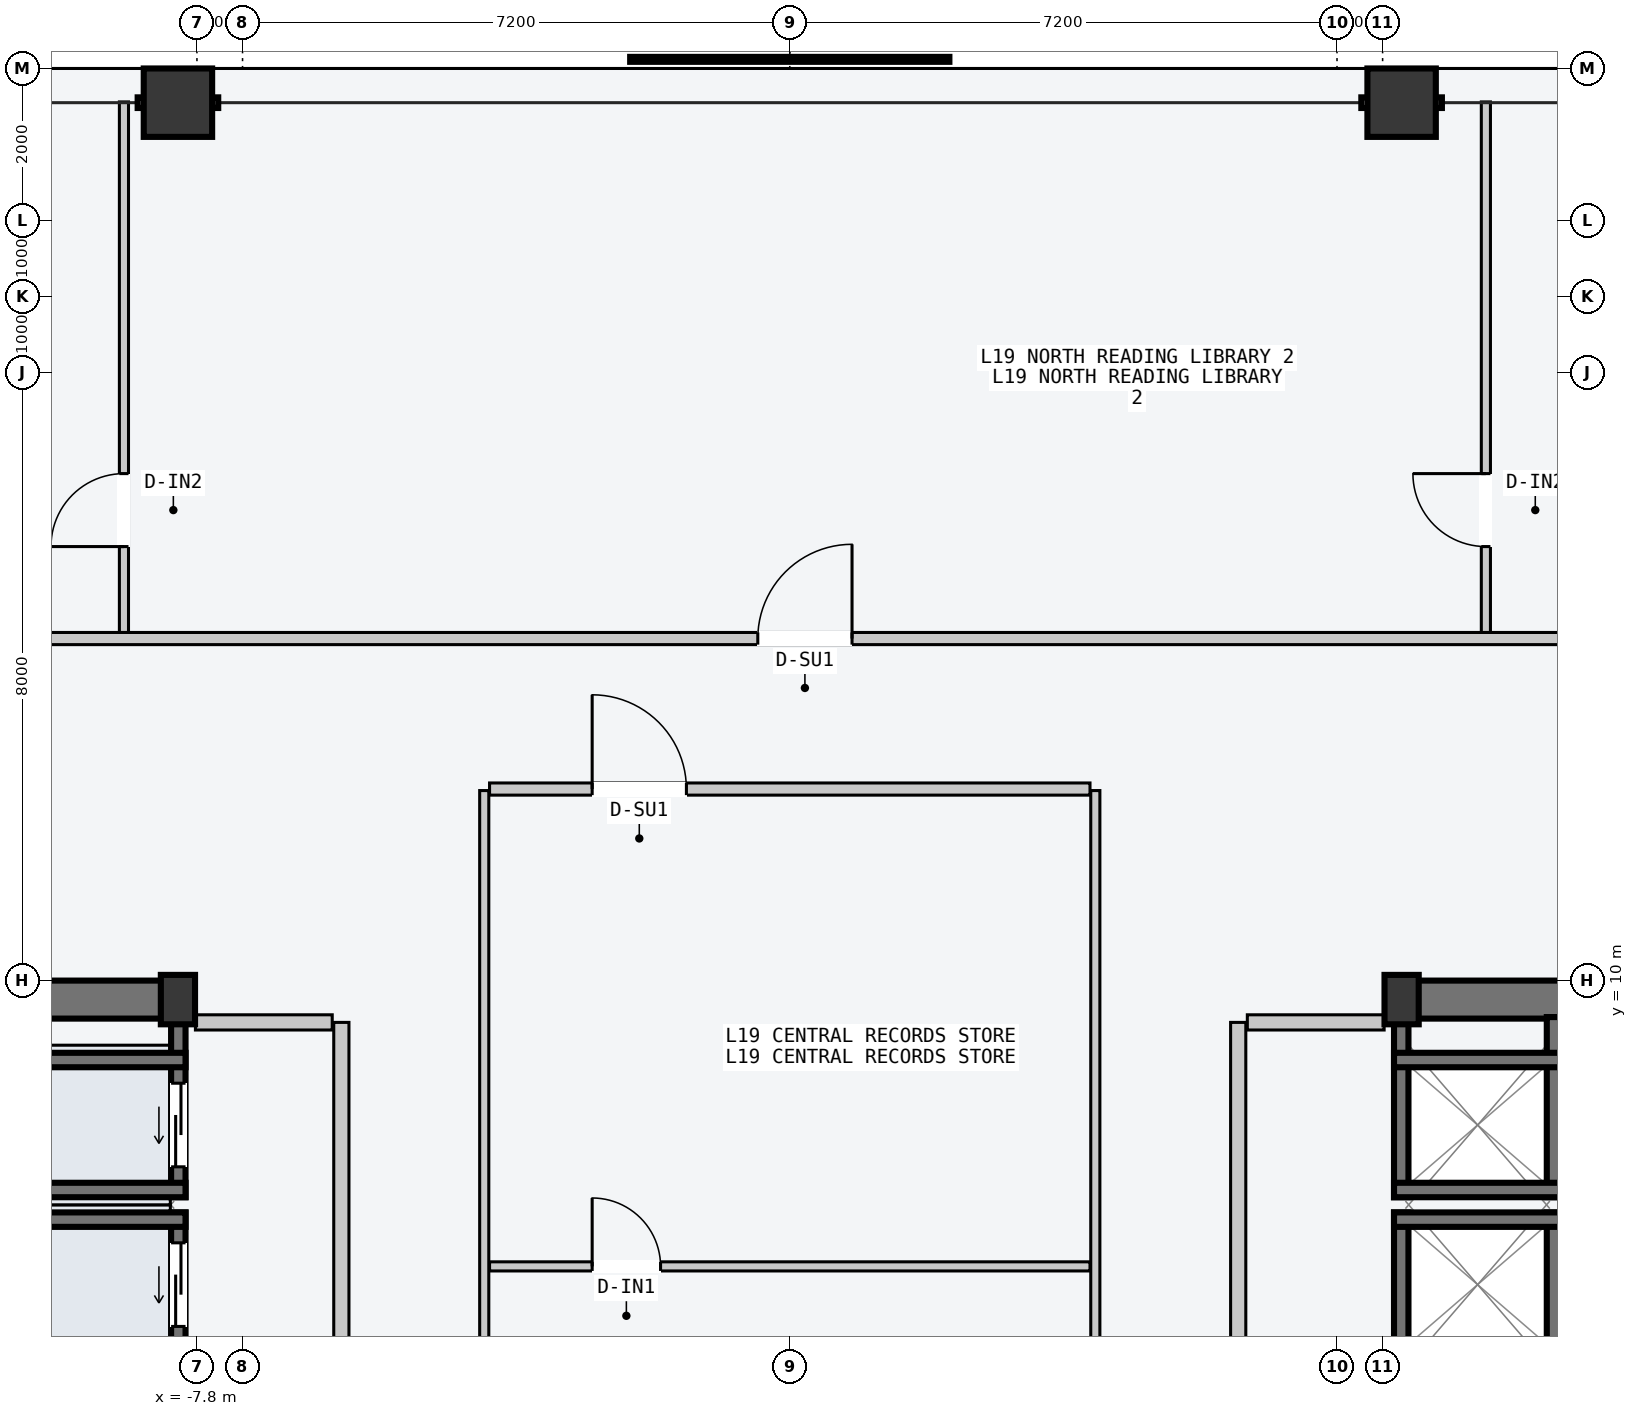
"""IFC4 building model, lengths in metres.
Left out: names, types, materials, properties, quantities, classifications, styles, units other than length and angle.
Written with IfcOpenShell. Run it as: python <this file> out.ifc"""

import sys

from ifc_helpers import new_model, si_unit, direction, frame, frame_2d, origin, origin_2d, place, context, subcontext, project, spatial, rectangle, hollow_rectangle, i_section, extrude, element, fill, save


model = new_model("IFC4")
c1 = context("Model", 3, precision=1e-05, world=origin(), true_north=direction((0.0, 1.0)))
c2 = subcontext(c1, "Body", "Model", "MODEL_VIEW")
j1 = project(units=[si_unit("LENGTHUNIT", "METRE"), si_unit("PLANEANGLEUNIT", "RADIAN")], contexts=[c1])
p1 = place(None, origin())
s1 = spatial("IfcSite", under=j1, at=p1, CompositionType="ELEMENT")
p2 = place(p1, origin())
s2 = spatial("IfcBuilding", under=s1, at=p2, CompositionType="ELEMENT")
p3 = place(p2, frame((0.0, 0.0, 74.4)))
s3 = spatial("IfcBuildingStorey", under=s2, at=p3, CompositionType="ELEMENT", Elevation=74.4)
for number, where, z_axis, x_axis in (
    (1, (-14.53, 9.75, -0.2), (0.0, 0.0, 1.0), (1.0, 0.0, 0.0)),
    (2, (8.07, 9.75, -0.2), (0.0, 0.0, 1.0), (1.0, 0.0, 0.0)),
):
    element("IfcWall", number, at=place(p3, frame(where, z_axis=z_axis, x_axis=x_axis)), inside=s3, PredefinedType="SHEAR", context=c2, shape_type="SweptSolid", body=[
        extrude(rectangle(XDim=6.46, YDim=0.5, at=frame_2d((3.23, 0.0))), origin(), (0.0, 0.0, 1.0), 3.6),
    ])
for number, where, z_axis, x_axis in (
    (3, (-8.05, 9.75, 0.0), (0.0, 0.0, 1.0), (1.0, 0.0, 0.0)),
    (4, (8.05, 9.75, 0.0), (0.0, 0.0, 1.0), (1.0, 0.0, 0.0)),
):
    element("IfcColumn", number, at=place(p3, frame(where, z_axis=z_axis, x_axis=x_axis)), inside=s3, PredefinedType="COLUMN", context=c2, shape_type="SweptSolid", body=[
        extrude(i_section(OverallWidth=0.45, OverallDepth=0.65, WebThickness=0.025, FlangeThickness=0.04, at=origin_2d()), origin(), (0.0, 0.0, 1.0), 3.6),
    ])
for number, where, z_axis, x_axis in (
    (5, (-8.05, 21.55, 0.0), (0.0, 0.0, 1.0), (1.0, 0.0, 0.0)),
    (6, (8.05, 21.55, 0.0), (0.0, 0.0, 1.0), (1.0, 0.0, 0.0)),
):
    element("IfcColumn", number, at=place(p3, frame(where, z_axis=z_axis, x_axis=x_axis)), inside=s3, PredefinedType="COLUMN", context=c2, shape_type="SweptSolid", body=[
        extrude(hollow_rectangle(XDim=0.9, YDim=0.9, WallThickness=0.045, at=origin_2d()), origin(), (0.0, 0.0, 1.0), 3.6),
    ])
p4 = place(p3, frame((-8.045, 5.05, -0.2), z_axis=(0.0, 0.0, 1.0), x_axis=(0.0, 1.0, 0.0)))
e7 = element("IfcWall", 7, at=p4, inside=s3, PredefinedType="SOLIDWALL", context=c2, shape_type="SweptSolid", body=[
    extrude(rectangle(XDim=1.9, YDim=0.19, at=frame_2d((0.95, 0.0))), origin(), (0.0, 0.0, 1.0), 3.6),
])
p5 = place(p4, frame((0.4, 0.0, 0.2)))
e8 = element("IfcOpeningElement", 8, at=p5, cuts=e7, PredefinedType="OPENING", context=c2, shape_type="SweptSolid", body=[
    extrude(rectangle(XDim=1.1, YDim=2.2, at=frame_2d((0.55, 1.1))), frame((0.0, 0.105, 0.0), z_axis=(0.0, -1.0, 0.0), x_axis=(1.0, 0.0, 0.0)), (0.0, 0.0, 1.0), 0.21),
])
p6 = place(p3, frame((-10.15, 6.855, -0.2), z_axis=(0.0, 0.0, 1.0), x_axis=(1.0, 0.0, 0.0)))
e9 = element("IfcWall", 9, at=p6, inside=s3, PredefinedType="SOLIDWALL", context=c2, shape_type="SweptSolid", body=[
    extrude(rectangle(XDim=2.2, YDim=0.19, at=frame_2d((1.1, 0.0))), origin(), (0.0, 0.0, 1.0), 3.6),
])
p7 = place(p3, frame((-8.045, 7.15, -0.2), z_axis=(0.0, 0.0, 1.0), x_axis=(0.0, 1.0, 0.0)))
e10 = element("IfcWall", 10, at=p7, inside=s3, PredefinedType="SOLIDWALL", context=c2, shape_type="SweptSolid", body=[
    extrude(rectangle(XDim=2.37, YDim=0.19, at=frame_2d((1.185, 0.0))), origin(), (0.0, 0.0, 1.0), 3.6),
])
p8 = place(p7, frame((0.4, 0.0, 0.2)))
e11 = element("IfcOpeningElement", 11, at=p8, cuts=e10, PredefinedType="OPENING", context=c2, shape_type="SweptSolid", body=[
    extrude(rectangle(XDim=1.1, YDim=2.2, at=frame_2d((0.55, 1.1))), frame((0.0, 0.105, 0.0), z_axis=(0.0, -1.0, 0.0), x_axis=(1.0, 0.0, 0.0)), (0.0, 0.0, 1.0), 0.21),
])
for number, where, z_axis, x_axis in (
    (12, (-10.15, 8.955, -0.2), (0.0, 0.0, 1.0), (1.0, 0.0, 0.0)),
    (13, (-10.15, 7.245, -0.2), (0.0, 0.0, 1.0), (1.0, 0.0, 0.0)),
):
    element("IfcWall", number, at=place(p3, frame(where, z_axis=z_axis, x_axis=x_axis)), inside=s3, PredefinedType="SOLIDWALL", context=c2, shape_type="SweptSolid", body=[
        extrude(rectangle(XDim=2.2, YDim=0.19, at=frame_2d((1.1, 0.0))), origin(), (0.0, 0.0, 1.0), 3.6),
    ])
for number, where, z_axis, x_axis in (
    (14, (8.045, 5.05, -0.2), (0.0, 0.0, 1.0), (0.0, 1.0, 0.0)),
    (15, (10.055, 5.05, -0.2), (0.0, 0.0, 1.0), (0.0, 1.0, 0.0)),
):
    element("IfcWall", number, at=place(p3, frame(where, z_axis=z_axis, x_axis=x_axis)), inside=s3, PredefinedType="SOLIDWALL", context=c2, shape_type="SweptSolid", body=[
        extrude(rectangle(XDim=1.9, YDim=0.19, at=frame_2d((0.95, 0.0))), origin(), (0.0, 0.0, 1.0), 3.6),
    ])
p9 = place(p3, frame((7.95, 6.855, -0.2), z_axis=(0.0, 0.0, 1.0), x_axis=(1.0, 0.0, 0.0)))
e16 = element("IfcWall", 16, at=p9, inside=s3, PredefinedType="SOLIDWALL", context=c2, shape_type="SweptSolid", body=[
    extrude(rectangle(XDim=2.2, YDim=0.19, at=frame_2d((1.1, 0.0))), origin(), (0.0, 0.0, 1.0), 3.6),
])
for number, where, z_axis, x_axis in (
    (17, (8.045, 7.15, -0.2), (0.0, 0.0, 1.0), (0.0, 1.0, 0.0)),
    (18, (10.055, 7.15, -0.2), (0.0, 0.0, 1.0), (0.0, 1.0, 0.0)),
):
    element("IfcWall", number, at=place(p3, frame(where, z_axis=z_axis, x_axis=x_axis)), inside=s3, PredefinedType="SOLIDWALL", context=c2, shape_type="SweptSolid", body=[
        extrude(rectangle(XDim=2.37, YDim=0.19, at=frame_2d((1.185, 0.0))), origin(), (0.0, 0.0, 1.0), 3.6),
    ])
for number, where, z_axis, x_axis in (
    (19, (7.95, 8.955, -0.2), (0.0, 0.0, 1.0), (1.0, 0.0, 0.0)),
    (20, (7.95, 7.245, -0.2), (0.0, 0.0, 1.0), (1.0, 0.0, 0.0)),
):
    element("IfcWall", number, at=place(p3, frame(where, z_axis=z_axis, x_axis=x_axis)), inside=s3, PredefinedType="SOLIDWALL", context=c2, shape_type="SweptSolid", body=[
        extrude(rectangle(XDim=2.2, YDim=0.19, at=frame_2d((1.1, 0.0))), origin(), (0.0, 0.0, 1.0), 3.6),
    ])
p10 = place(p3, frame((-5.9, -9.45, 0.0), z_axis=(0.0, 0.0, 1.0), x_axis=(0.0, 1.0, 0.0)))
e21 = element("IfcWall", 21, at=p10, inside=s3, PredefinedType="PARTITIONING", context=c2, shape_type="SweptSolid", body=[
    extrude(rectangle(XDim=18.9, YDim=0.2, at=frame_2d((9.45, 0.0))), origin(), (0.0, 0.0, 1.0), 3.4),
])
p11 = place(p10, frame((3.9, 0.0, 0.0)))
e22 = element("IfcOpeningElement", 22, at=p11, cuts=e21, PredefinedType="OPENING", context=c2, shape_type="SweptSolid", body=[
    extrude(rectangle(XDim=1.5, YDim=2.2, at=frame_2d((0.75, 1.1))), frame((0.0, 0.11, 0.0), z_axis=(0.0, -1.0, 0.0), x_axis=(1.0, 0.0, 0.0)), (0.0, 0.0, 1.0), 0.22),
])
p12 = place(p3, frame((-6.02, 9.45, 0.0), z_axis=(0.0, 0.0, 1.0), x_axis=(-1.0, 0.0, 0.0)))
e23 = element("IfcWall", 23, at=p12, inside=s3, PredefinedType="PARTITIONING", context=c2, shape_type="SweptSolid", body=[
    extrude(rectangle(XDim=1.8, YDim=0.2, at=frame_2d((0.9, 0.0))), origin(), (0.0, 0.0, 1.0), 3.4),
])
p13 = place(p3, frame((5.9, -9.45, 0.0), z_axis=(0.0, 0.0, 1.0), x_axis=(0.0, 1.0, 0.0)))
e24 = element("IfcWall", 24, at=p13, inside=s3, PredefinedType="PARTITIONING", context=c2, shape_type="SweptSolid", body=[
    extrude(rectangle(XDim=18.9, YDim=0.2, at=frame_2d((9.45, 0.0))), origin(), (0.0, 0.0, 1.0), 3.4),
])
p14 = place(p13, frame((3.9, 0.0, 0.0)))
e25 = element("IfcOpeningElement", 25, at=p14, cuts=e24, PredefinedType="OPENING", context=c2, shape_type="SweptSolid", body=[
    extrude(rectangle(XDim=1.5, YDim=2.2, at=frame_2d((0.75, 1.1))), frame((0.0, 0.11, 0.0), z_axis=(0.0, -1.0, 0.0), x_axis=(1.0, 0.0, 0.0)), (0.0, 0.0, 1.0), 0.22),
])
p15 = place(p3, frame((6.02, 9.45, 0.0), z_axis=(0.0, 0.0, 1.0), x_axis=(1.0, 0.0, 0.0)))
e26 = element("IfcWall", 26, at=p15, inside=s3, PredefinedType="PARTITIONING", context=c2, shape_type="SweptSolid", body=[
    extrude(rectangle(XDim=1.8, YDim=0.2, at=frame_2d((0.9, 0.0))), origin(), (0.0, 0.0, 1.0), 3.4),
])
for number, where, z_axis, x_axis in (
    (27, (-4.02, -12.5, 0.0), (0.0, 0.0, 1.0), (0.0, 1.0, 0.0)),
    (28, (4.02, -12.5, 0.0), (0.0, 0.0, 1.0), (0.0, 1.0, 0.0)),
):
    element("IfcWall", number, at=place(p3, frame(where, z_axis=z_axis, x_axis=x_axis)), inside=s3, PredefinedType="PARTITIONING", context=c2, shape_type="SweptSolid", body=[
        extrude(rectangle(XDim=25.0, YDim=0.12, at=frame_2d((12.5, 0.0))), origin(), (0.0, 0.0, 1.0), 3.4),
    ])
p16 = place(p3, frame((-3.95, 12.52, 0.0), z_axis=(0.0, 0.0, 1.0), x_axis=(1.0, 0.0, 0.0)))
e29 = element("IfcWall", 29, at=p16, inside=s3, PredefinedType="PARTITIONING", context=c2, shape_type="SweptSolid", body=[
    extrude(rectangle(XDim=7.9, YDim=0.16, at=frame_2d((3.95, 0.0))), origin(), (0.0, 0.0, 1.0), 3.4),
])
p17 = place(p16, frame((1.35, 0.0, 0.0)))
e30 = element("IfcOpeningElement", 30, at=p17, cuts=e29, PredefinedType="OPENING", context=c2, shape_type="SweptSolid", body=[
    extrude(rectangle(XDim=1.24, YDim=2.24, at=frame_2d((0.62, 1.12))), frame((0.0, 0.09, 0.0), z_axis=(0.0, -1.0, 0.0), x_axis=(1.0, 0.0, 0.0)), (0.0, 0.0, 1.0), 0.18),
])
p18 = place(p3, frame((-3.95, 6.24, 0.0), z_axis=(0.0, 0.0, 1.0), x_axis=(1.0, 0.0, 0.0)))
e31 = element("IfcWall", 31, at=p18, inside=s3, PredefinedType="PARTITIONING", context=c2, shape_type="SweptSolid", body=[
    extrude(rectangle(XDim=7.9, YDim=0.12, at=frame_2d((3.95, 0.0))), origin(), (0.0, 0.0, 1.0), 3.4),
])
p19 = place(p18, frame((1.35, 0.0, 0.0)))
e32 = element("IfcOpeningElement", 32, at=p19, cuts=e31, PredefinedType="OPENING", context=c2, shape_type="SweptSolid", body=[
    extrude(rectangle(XDim=0.9, YDim=2.15, at=frame_2d((0.45, 1.075))), frame((0.0, 0.07, 0.0), z_axis=(0.0, -1.0, 0.0), x_axis=(1.0, 0.0, 0.0)), (0.0, 0.0, 1.0), 0.14),
])
p20 = place(p3, frame((-8.76, 14.56, 0.0), z_axis=(0.0, 0.0, 1.0), x_axis=(0.0, 1.0, 0.0)))
e33 = element("IfcWall", 33, at=p20, inside=s3, PredefinedType="PARTITIONING", context=c2, shape_type="SweptSolid", body=[
    extrude(rectangle(XDim=7.0, YDim=0.12, at=frame_2d((3.5, 0.0))), origin(), (0.0, 0.0, 1.0), 3.4),
])
p21 = place(p20, frame((1.15, 0.0, 0.0)))
e34 = element("IfcOpeningElement", 34, at=p21, cuts=e33, PredefinedType="OPENING", context=c2, shape_type="SweptSolid", body=[
    extrude(rectangle(XDim=0.96, YDim=2.18, at=frame_2d((0.48, 1.09))), frame((0.0, 0.07, 0.0), z_axis=(0.0, -1.0, 0.0), x_axis=(1.0, 0.0, 0.0)), (0.0, 0.0, 1.0), 0.14),
])
p22 = place(p3, frame((9.159, 14.56, 0.0), z_axis=(0.0, 0.0, 1.0), x_axis=(0.0, 1.0, 0.0)))
e35 = element("IfcWall", 35, at=p22, inside=s3, PredefinedType="PARTITIONING", context=c2, shape_type="SweptSolid", body=[
    extrude(rectangle(XDim=7.0, YDim=0.12, at=frame_2d((3.5, 0.0))), origin(), (0.0, 0.0, 1.0), 3.4),
])
p23 = place(p22, frame((1.15, 0.0, 0.0)))
e36 = element("IfcOpeningElement", 36, at=p23, cuts=e35, PredefinedType="OPENING", context=c2, shape_type="SweptSolid", body=[
    extrude(rectangle(XDim=0.96, YDim=2.18, at=frame_2d((0.48, 1.09))), frame((0.0, 0.07, 0.0), z_axis=(0.0, -1.0, 0.0), x_axis=(1.0, 0.0, 0.0)), (0.0, 0.0, 1.0), 0.14),
])
p24 = place(p3, frame((-18.0, 14.5, 0.0), z_axis=(0.0, 0.0, 1.0), x_axis=(1.0, 0.0, 0.0)))
e37 = element("IfcWall", 37, at=p24, inside=s3, PredefinedType="PARTITIONING", context=c2, shape_type="SweptSolid", body=[
    extrude(rectangle(XDim=36.0, YDim=0.16, at=frame_2d((18.0, 0.0))), origin(), (0.0, 0.0, 1.0), 3.4),
])
p25 = place(p24, frame((4.09, 0.0, 0.0)))
e38 = element("IfcOpeningElement", 38, at=p25, cuts=e37, PredefinedType="OPENING", context=c2, shape_type="SweptSolid", body=[
    extrude(rectangle(XDim=1.06, YDim=2.2, at=frame_2d((0.53, 1.1))), frame((0.0, 0.09, 0.0), z_axis=(0.0, -1.0, 0.0), x_axis=(1.0, 0.0, 0.0)), (0.0, 0.0, 1.0), 0.18),
])
p26 = place(p24, frame((17.579, 0.0, 0.0)))
e39 = element("IfcOpeningElement", 39, at=p26, cuts=e37, PredefinedType="OPENING", context=c2, shape_type="SweptSolid", body=[
    extrude(rectangle(XDim=1.24, YDim=2.24, at=frame_2d((0.62, 1.12))), frame((0.0, 0.09, 0.0), z_axis=(0.0, -1.0, 0.0), x_axis=(1.0, 0.0, 0.0)), (0.0, 0.0, 1.0), 0.18),
])
p27 = place(p24, frame((30.879, 0.0, 0.0)))
e40 = element("IfcOpeningElement", 40, at=p27, cuts=e37, PredefinedType="OPENING", context=c2, shape_type="SweptSolid", body=[
    extrude(rectangle(XDim=1.4, YDim=2.2, at=frame_2d((0.7, 1.1))), frame((0.0, 0.09, 0.0), z_axis=(0.0, -1.0, 0.0), x_axis=(1.0, 0.0, 0.0)), (0.0, 0.0, 1.0), 0.18),
])
p28 = place(p5, origin())
e41 = element("IfcDoor", 41, at=p28, inside=s3, OperationType="SLIDING_TO_LEFT", PredefinedType="DOOR", context=c2, shape_type="SweptSolid", body=[
    extrude(rectangle(XDim=1.1, YDim=2.2, at=frame_2d((0.55, 1.1))), frame((0.0, 0.025, 0.0), z_axis=(0.0, -1.0, 0.0), x_axis=(1.0, 0.0, 0.0)), (0.0, 0.0, 1.0), 0.05),
])
fill(e8, e41)
p29 = place(p8, origin())
e42 = element("IfcDoor", 42, at=p29, inside=s3, OperationType="SLIDING_TO_LEFT", PredefinedType="DOOR", context=c2, shape_type="SweptSolid", body=[
    extrude(rectangle(XDim=1.1, YDim=2.2, at=frame_2d((0.55, 1.1))), frame((0.0, 0.025, 0.0), z_axis=(0.0, -1.0, 0.0), x_axis=(1.0, 0.0, 0.0)), (0.0, 0.0, 1.0), 0.05),
])
fill(e11, e42)
p30 = place(p17, origin())
e43 = element("IfcDoor", 43, at=p30, inside=s3, OperationType="SINGLE_SWING_LEFT", PredefinedType="DOOR", context=c2, shape_type="SweptSolid", body=[
    extrude(rectangle(XDim=1.24, YDim=2.24, at=frame_2d((0.62, 1.12))), frame((0.0, 0.025, 0.0), z_axis=(0.0, -1.0, 0.0), x_axis=(1.0, 0.0, 0.0)), (0.0, 0.0, 1.0), 0.05),
])
fill(e30, e43)
p31 = place(p19, origin())
e44 = element("IfcDoor", 44, at=p31, inside=s3, OperationType="SINGLE_SWING_LEFT", PredefinedType="DOOR", context=c2, shape_type="SweptSolid", body=[
    extrude(rectangle(XDim=0.9, YDim=2.15, at=frame_2d((0.45, 1.075))), frame((0.0, 0.025, 0.0), z_axis=(0.0, -1.0, 0.0), x_axis=(1.0, 0.0, 0.0)), (0.0, 0.0, 1.0), 0.05),
])
fill(e32, e44)
p32 = place(p21, origin())
e45 = element("IfcDoor", 45, at=p32, inside=s3, OperationType="SINGLE_SWING_LEFT", PredefinedType="DOOR", context=c2, shape_type="SweptSolid", body=[
    extrude(rectangle(XDim=0.96, YDim=2.18, at=frame_2d((0.48, 1.09))), frame((0.0, 0.025, 0.0), z_axis=(0.0, -1.0, 0.0), x_axis=(1.0, 0.0, 0.0)), (0.0, 0.0, 1.0), 0.05),
])
fill(e34, e45)
p33 = place(p23, origin())
e46 = element("IfcDoor", 46, at=p33, inside=s3, OperationType="SINGLE_SWING_RIGHT", PredefinedType="DOOR", context=c2, shape_type="SweptSolid", body=[
    extrude(rectangle(XDim=0.96, YDim=2.18, at=frame_2d((0.48, 1.09))), frame((0.0, 0.025, 0.0), z_axis=(0.0, -1.0, 0.0), x_axis=(1.0, 0.0, 0.0)), (0.0, 0.0, 1.0), 0.05),
])
fill(e36, e46)
p34 = place(p26, origin())
e47 = element("IfcDoor", 47, at=p34, inside=s3, OperationType="SINGLE_SWING_RIGHT", PredefinedType="DOOR", context=c2, shape_type="SweptSolid", body=[
    extrude(rectangle(XDim=1.24, YDim=2.24, at=frame_2d((0.62, 1.12))), frame((0.0, 0.025, 0.0), z_axis=(0.0, -1.0, 0.0), x_axis=(1.0, 0.0, 0.0)), (0.0, 0.0, 1.0), 0.05),
])
fill(e39, e47)
save(model, sys.argv[1])
